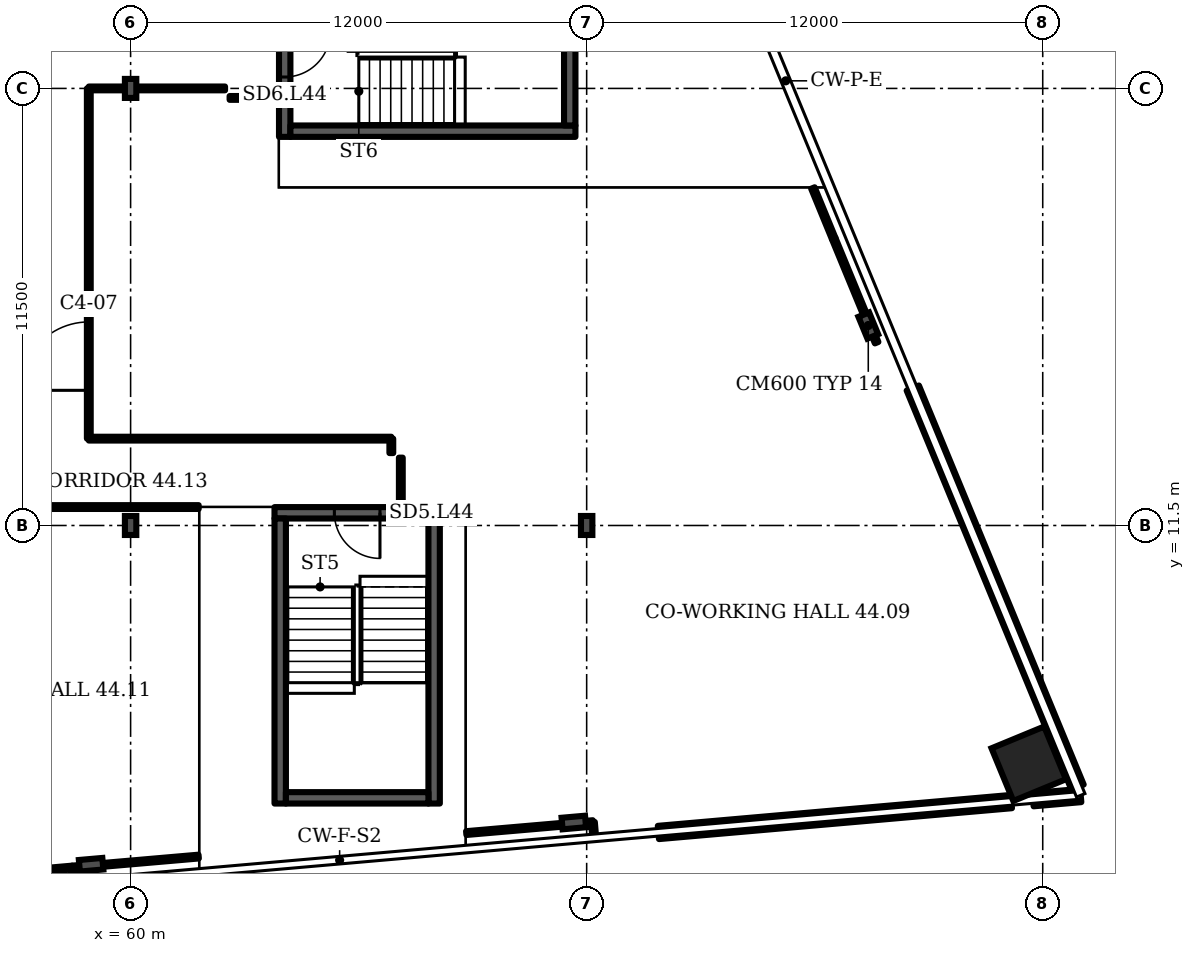
"""IFC4 building model, lengths in metres.
Left out: names, types, materials, properties, quantities, classifications, styles, units other than length and angle.
Written with IfcOpenShell. Run it as: python <this file> out.ifc"""

import sys

from ifc_helpers import new_model, si_unit, direction, frame, frame_2d, origin, origin_2d, place, context, subcontext, project, spatial, rectangle, i_section, extrude, element, fill, save


model = new_model("IFC4")
c1 = context("Model", 3, precision=1e-05, world=origin(), true_north=direction((0.0, 1.0)))
c2 = subcontext(c1, "Body", "Model", "MODEL_VIEW")
j1 = project(units=[si_unit("LENGTHUNIT", "METRE"), si_unit("PLANEANGLEUNIT", "RADIAN")], contexts=[c1])
p1 = place(None, origin())
s1 = spatial("IfcSite", under=j1, at=p1, CompositionType="ELEMENT")
p2 = place(p1, origin())
s2 = spatial("IfcBuilding", under=s1, at=p2, CompositionType="ELEMENT")
p3 = place(p2, frame((0.0, 0.0, 180.7)))
s3 = spatial("IfcBuildingStorey", under=s2, at=p3, CompositionType="ELEMENT", Elevation=180.7)
p4 = place(p3, frame((83.633, 5.231, 0.0), z_axis=(0.0, 0.0, 1.0), x_axis=(-0.381602, 0.924325, 0.0)))
e1 = element("IfcColumn", 1, at=p4, inside=s3, PredefinedType="COLUMN", context=c2, shape_type="SweptSolid", body=[
    extrude(rectangle(XDim=1.5, YDim=1.5, at=origin_2d()), origin(), (0.0, 0.0, 1.0), 3.6),
])
for number, where, z_axis, x_axis in (
    (2, (58.961, 2.573, 0.0), (0.0, 0.0, 1.0), (0.087, -0.996, 0.0)),
    (3, (71.662, 3.685, 0.0), (0.0, 0.0, 1.0), (0.087, -0.996, 0.0)),
    (4, (79.41, 16.762, 0.0), (0.0, 0.0, 1.0), (0.924, 0.382, 0.0)),
):
    element("IfcColumn", number, at=place(p3, frame(where, z_axis=z_axis, x_axis=x_axis)), inside=s3, PredefinedType="COLUMN", context=c2, shape_type="SweptSolid", body=[
        extrude(i_section(OverallWidth=0.305, OverallDepth=0.62, WebThickness=0.021, FlangeThickness=0.04, FilletRadius=0.027, at=origin_2d()), origin(), (0.0, 0.0, 1.0), 3.6),
    ])
for number, where, z_axis, x_axis in (
    (5, (60.0, 11.5, 0.0), (0.0, 0.0, 1.0), (1.0, 0.0, 0.0)),
    (6, (72.0, 11.5, 0.0), (0.0, 0.0, 1.0), (1.0, 0.0, 0.0)),
    (7, (60.0, 23.0, 0.0), (0.0, 0.0, 1.0), (1.0, 0.0, 0.0)),
):
    element("IfcColumn", number, at=place(p3, frame(where, z_axis=z_axis, x_axis=x_axis)), inside=s3, PredefinedType="COLUMN", context=c2, shape_type="SweptSolid", body=[
        extrude(i_section(OverallWidth=0.3, OverallDepth=0.5, WebThickness=0.014, FlangeThickness=0.028, FilletRadius=0.027, at=origin_2d()), origin(), (0.0, 0.0, 1.0), 3.6),
    ])
p5 = place(p3, frame((73.887, 3.423, 0.0), z_axis=(0.0, 0.0, 1.0), x_axis=(0.996197, 0.087145, 0.0)))
e8 = element("IfcWall", 8, at=p5, inside=s3, PredefinedType="SOLIDWALL", context=c2, shape_type="SweptSolid", body=[
    extrude(rectangle(XDim=9.323, YDim=0.35, at=frame_2d((4.662, 0.0))), origin(), (0.0, 0.0, 1.0), 1.0),
])
p6 = place(p3, frame((83.745, 4.285, 0.0), z_axis=(0.0, 0.0, 1.0), x_axis=(0.996198, 0.087148, 0.0)))
e9 = element("IfcWall", 9, at=p6, inside=s3, PredefinedType="SOLIDWALL", context=c2, shape_type="SweptSolid", body=[
    extrude(rectangle(XDim=1.261, YDim=0.35, at=frame_2d((0.63, 0.0))), origin(), (0.0, 0.0, 1.0), 1.0),
])
p7 = place(p3, frame((84.916, 4.616, 0.0), z_axis=(0.0, 0.0, 1.0), x_axis=(-0.381598, 0.924328, 0.0)))
e10 = element("IfcWall", 10, at=p7, inside=s3, PredefinedType="SOLIDWALL", context=c2, shape_type="SweptSolid", body=[
    extrude(rectangle(XDim=11.361, YDim=0.35, at=frame_2d((5.68, 0.0))), origin(), (0.0, 0.0, 1.0), 1.0),
])
p8 = place(p3, frame((63.786, 11.834, 0.0), z_axis=(0.0, 0.0, 1.0), x_axis=(1.0, 0.0, 0.0)))
e11 = element("IfcWall", 11, at=p8, inside=s3, PredefinedType="SHEAR", context=c2, shape_type="SweptSolid", body=[
    extrude(rectangle(XDim=4.35, YDim=0.3, at=frame_2d((2.175, 0.0))), origin(), (0.0, 0.0, 1.0), 3.2),
])
p9 = place(p8, frame((1.575, 0.0, 0.0)))
e12 = element("IfcOpeningElement", 12, at=p9, cuts=e11, PredefinedType="OPENING", context=c2, shape_type="SweptSolid", body=[
    extrude(rectangle(XDim=1.2, YDim=2.1, at=frame_2d((0.6, 1.05))), frame((0.0, 0.16, 0.0), z_axis=(0.0, -1.0, 0.0), x_axis=(1.0, 0.0, 0.0)), (0.0, 0.0, 1.0), 0.32),
])
p10 = place(p3, frame((64.055, 21.725, 0.0), z_axis=(0.0, 0.0, 1.0), x_axis=(0.0, 1.0, 0.0)))
e13 = element("IfcWall", 13, at=p10, inside=s3, PredefinedType="SHEAR", context=c2, shape_type="SweptSolid", body=[
    extrude(rectangle(XDim=4.35, YDim=0.3, at=frame_2d((2.175, 0.0))), origin(), (0.0, 0.0, 1.0), 3.2),
])
p11 = place(p10, frame((1.575, 0.0, 0.0)))
e14 = element("IfcOpeningElement", 14, at=p11, cuts=e13, PredefinedType="OPENING", context=c2, shape_type="SweptSolid", body=[
    extrude(rectangle(XDim=1.2, YDim=2.1, at=frame_2d((0.6, 1.05))), frame((0.0, 0.16, 0.0), z_axis=(0.0, -1.0, 0.0), x_axis=(1.0, 0.0, 0.0)), (0.0, 0.0, 1.0), 0.32),
])
p12 = place(p3, frame((52.5, 1.975, 0.0), z_axis=(0.0, 0.0, 1.0), x_axis=(0.99615, 0.087657, 0.0)))
e15 = element("IfcWall", 15, at=p12, inside=s3, PredefinedType="PARTITIONING", context=c2, shape_type="SweptSolid", body=[
    extrude(rectangle(XDim=5.988, YDim=0.1, at=frame_2d((2.994, 0.0))), origin(), (0.0, 0.0, 1.0), 3.2),
])
p13 = place(p3, frame((57.1, 11.985, 0.0), z_axis=(0.0, 0.0, 1.0), x_axis=(1.0, 0.0, 0.0)))
e16 = element("IfcWall", 16, at=p13, inside=s3, PredefinedType="PARTITIONING", context=c2, shape_type="SweptSolid", body=[
    extrude(rectangle(XDim=4.691, YDim=0.1, at=frame_2d((2.346, 0.0))), origin(), (0.0, 0.0, 1.0), 3.2),
])
p14 = place(p3, frame((58.465, 2.5, 0.0), z_axis=(0.0, 0.0, 1.0), x_axis=(0.996263, 0.086355, 0.0)))
e17 = element("IfcWall", 17, at=p14, inside=s3, PredefinedType="PARTITIONING", context=c2, shape_type="SweptSolid", body=[
    extrude(rectangle(XDim=3.339, YDim=0.1, at=frame_2d((1.669, 0.0))), origin(), (0.0, 0.0, 1.0), 2.58),
])
p15 = place(p3, frame((58.498, 2.102, 0.0), z_axis=(0.0, 0.0, 1.0), x_axis=(-0.083045, 0.996542, 0.0)))
e18 = element("IfcWall", 18, at=p15, inside=s3, PredefinedType="PARTITIONING", context=c2, shape_type="SweptSolid", body=[
    extrude(rectangle(XDim=0.4, YDim=0.1, at=frame_2d((0.2, 0.0))), origin(), (0.0, 0.0, 1.0), 3.2),
])
p16 = place(p3, frame((58.9, 13.785, 0.0), z_axis=(0.0, 0.0, 1.0), x_axis=(0.0, 1.0, 0.0)))
e19 = element("IfcWall", 19, at=p16, inside=s3, PredefinedType="PARTITIONING", context=c2, shape_type="SweptSolid", body=[
    extrude(rectangle(XDim=9.215, YDim=0.1, at=frame_2d((4.607, 0.0))), origin(), (0.0, 0.0, 1.0), 3.2),
])
p17 = place(p16, frame((1.271, 0.0, 0.0)))
e20 = element("IfcOpeningElement", 20, at=p17, cuts=e19, PredefinedType="OPENING", context=c2, shape_type="SweptSolid", body=[
    extrude(rectangle(XDim=1.8, YDim=2.1, at=frame_2d((0.9, 1.05))), frame((0.0, 0.06, 0.0), z_axis=(0.0, -1.0, 0.0), x_axis=(1.0, 0.0, 0.0)), (0.0, 0.0, 1.0), 0.12),
])
p18 = place(p3, frame((58.9, 13.785, 0.0), z_axis=(0.0, 0.0, 1.0), x_axis=(1.0, 0.0, 0.0)))
e21 = element("IfcWall", 21, at=p18, inside=s3, PredefinedType="PARTITIONING", context=c2, shape_type="SweptSolid", body=[
    extrude(rectangle(XDim=7.96, YDim=0.1, at=frame_2d((3.98, 0.0))), origin(), (0.0, 0.0, 1.0), 3.2),
])
p19 = place(p3, frame((58.9, 23.0, 0.0), z_axis=(0.0, 0.0, 1.0), x_axis=(1.0, 0.0, 0.0)))
e22 = element("IfcWall", 22, at=p19, inside=s3, PredefinedType="PARTITIONING", context=c2, shape_type="SweptSolid", body=[
    extrude(rectangle(XDim=3.585, YDim=0.1, at=frame_2d((1.792, 0.0))), origin(), (0.0, 0.0, 1.0), 3.2),
])
p20 = place(p3, frame((62.605, 22.75, 0.0), z_axis=(0.0, 0.0, 1.0), x_axis=(1.0, 0.0, 0.0)))
e23 = element("IfcWall", 23, at=p20, inside=s3, PredefinedType="PARTITIONING", context=c2, shape_type="SweptSolid", body=[
    extrude(rectangle(XDim=1.28, YDim=0.1, at=frame_2d((0.64, 0.0))), origin(), (0.0, 0.0, 1.0), 3.2),
])
p21 = place(p3, frame((66.86, 13.405, 0.0), z_axis=(0.0, 0.0, 1.0), x_axis=(0.0, 1.0, 0.0)))
e24 = element("IfcWall", 24, at=p21, inside=s3, PredefinedType="PARTITIONING", context=c2, shape_type="SweptSolid", body=[
    extrude(rectangle(XDim=0.38, YDim=0.1, at=frame_2d((0.19, 0.0))), origin(), (0.0, 0.0, 1.0), 3.2),
])
p22 = place(p3, frame((67.11, 12.004, 0.0), z_axis=(0.0, 0.0, 1.0), x_axis=(0.0, 1.0, 0.0)))
e25 = element("IfcWall", 25, at=p22, inside=s3, PredefinedType="PARTITIONING", context=c2, shape_type="SweptSolid", body=[
    extrude(rectangle(XDim=1.281, YDim=0.1, at=frame_2d((0.641, 0.0))), origin(), (0.0, 0.0, 1.0), 3.2),
])
p23 = place(p3, frame((68.831, 3.407, 0.0), z_axis=(0.0, 0.0, 1.0), x_axis=(0.996283, 0.086167, 0.0)))
e26 = element("IfcWall", 26, at=p23, inside=s3, PredefinedType="PARTITIONING", context=c2, shape_type="SweptSolid", body=[
    extrude(rectangle(XDim=3.346, YDim=0.1, at=frame_2d((1.673, 0.0))), origin(), (0.0, 0.0, 1.0), 2.58),
])
p24 = place(p3, frame((72.198, 3.3, 0.0), z_axis=(0.0, 0.0, 1.0), x_axis=(-0.083759, 0.996486, 0.0)))
e27 = element("IfcWall", 27, at=p24, inside=s3, PredefinedType="PARTITIONING", context=c2, shape_type="SweptSolid", body=[
    extrude(rectangle(XDim=0.396, YDim=0.1, at=frame_2d((0.198, 0.0))), origin(), (0.0, 0.0, 1.0), 3.2),
])
p25 = place(p3, frame((78.5, 19.05, 0.0), z_axis=(0.0, 0.0, 1.0), x_axis=(-0.380332, 0.924852, 0.0)))
e28 = element("IfcWall", 28, at=p25, inside=s3, PredefinedType="PARTITIONING", context=c2, shape_type="SweptSolid", body=[
    extrude(rectangle(XDim=1.438, YDim=0.1, at=frame_2d((0.719, 0.0))), origin(), (0.0, 0.0, 1.0), 2.58),
])
p26 = place(p3, frame((79.63, 16.31, 0.0), z_axis=(0.0, 0.0, 1.0), x_axis=(-0.381225, 0.924479, 0.0)))
e29 = element("IfcWall", 29, at=p26, inside=s3, PredefinedType="PARTITIONING", context=c2, shape_type="SweptSolid", body=[
    extrude(rectangle(XDim=2.964, YDim=0.1, at=frame_2d((1.482, 0.0))), origin(), (0.0, 0.0, 1.0), 2.58),
])
for number, where, z_axis, x_axis in (
    (30, (63.936, 4.184, 0.0), (0.0, 0.0, 1.0), (0.0, 1.0, 0.0)),
    (31, (67.986, 4.184, 0.0), (0.0, 0.0, 1.0), (0.0, 1.0, 0.0)),
):
    element("IfcWall", number, at=place(p3, frame(where, z_axis=z_axis, x_axis=x_axis)), inside=s3, PredefinedType="SHEAR", context=c2, shape_type="SweptSolid", body=[
        extrude(rectangle(XDim=7.5, YDim=0.3, at=frame_2d((3.75, 0.0))), origin(), (0.0, 0.0, 1.0), 3.2),
    ])
p27 = place(p3, frame((64.086, 4.334, 0.0), z_axis=(0.0, 0.0, 1.0), x_axis=(1.0, 0.0, 0.0)))
e32 = element("IfcWall", 32, at=p27, inside=s3, PredefinedType="SHEAR", context=c2, shape_type="SweptSolid", body=[
    extrude(rectangle(XDim=3.75, YDim=0.3, at=frame_2d((1.875, 0.0))), origin(), (0.0, 0.0, 1.0), 3.2),
])
p28 = place(p3, frame((64.205, 21.875, 0.0), z_axis=(0.0, 0.0, 1.0), x_axis=(1.0, 0.0, 0.0)))
e33 = element("IfcWall", 33, at=p28, inside=s3, PredefinedType="SHEAR", context=c2, shape_type="SweptSolid", body=[
    extrude(rectangle(XDim=7.5, YDim=0.3, at=frame_2d((3.75, 0.0))), origin(), (0.0, 0.0, 1.0), 3.2),
])
p29 = place(p3, frame((71.555, 22.025, 0.0), z_axis=(0.0, 0.0, 1.0), x_axis=(0.0, 1.0, 0.0)))
e34 = element("IfcWall", 34, at=p29, inside=s3, PredefinedType="SHEAR", context=c2, shape_type="SweptSolid", body=[
    extrude(rectangle(XDim=3.75, YDim=0.3, at=frame_2d((1.875, 0.0))), origin(), (0.0, 0.0, 1.0), 3.2),
])
p30 = place(p9, origin())
e35 = element("IfcDoor", 35, at=p30, inside=s3, OperationType="SINGLE_SWING_RIGHT", PredefinedType="DOOR", context=c2, shape_type="SweptSolid", body=[
    extrude(rectangle(XDim=1.2, YDim=2.1, at=frame_2d((0.6, 1.05))), frame((0.0, 0.025, 0.0), z_axis=(0.0, -1.0, 0.0), x_axis=(1.0, 0.0, 0.0)), (0.0, 0.0, 1.0), 0.05),
])
fill(e12, e35)
p31 = place(p11, origin())
e36 = element("IfcDoor", 36, at=p31, inside=s3, OperationType="SINGLE_SWING_RIGHT", PredefinedType="DOOR", context=c2, shape_type="SweptSolid", body=[
    extrude(rectangle(XDim=1.2, YDim=2.1, at=frame_2d((0.6, 1.05))), frame((0.0, 0.025, 0.0), z_axis=(0.0, -1.0, 0.0), x_axis=(1.0, 0.0, 0.0)), (0.0, 0.0, 1.0), 0.05),
])
fill(e14, e36)
p32 = place(p17, origin())
e37 = element("IfcDoor", 37, at=p32, inside=s3, OperationType="DOUBLE_DOOR_SINGLE_SWING", PredefinedType="DOOR", context=c2, shape_type="SweptSolid", body=[
    extrude(rectangle(XDim=1.8, YDim=2.1, at=frame_2d((0.9, 1.05))), frame((0.0, 0.025, 0.0), z_axis=(0.0, -1.0, 0.0), x_axis=(1.0, 0.0, 0.0)), (0.0, 0.0, 1.0), 0.05),
])
fill(e20, e37)
save(model, sys.argv[1])
